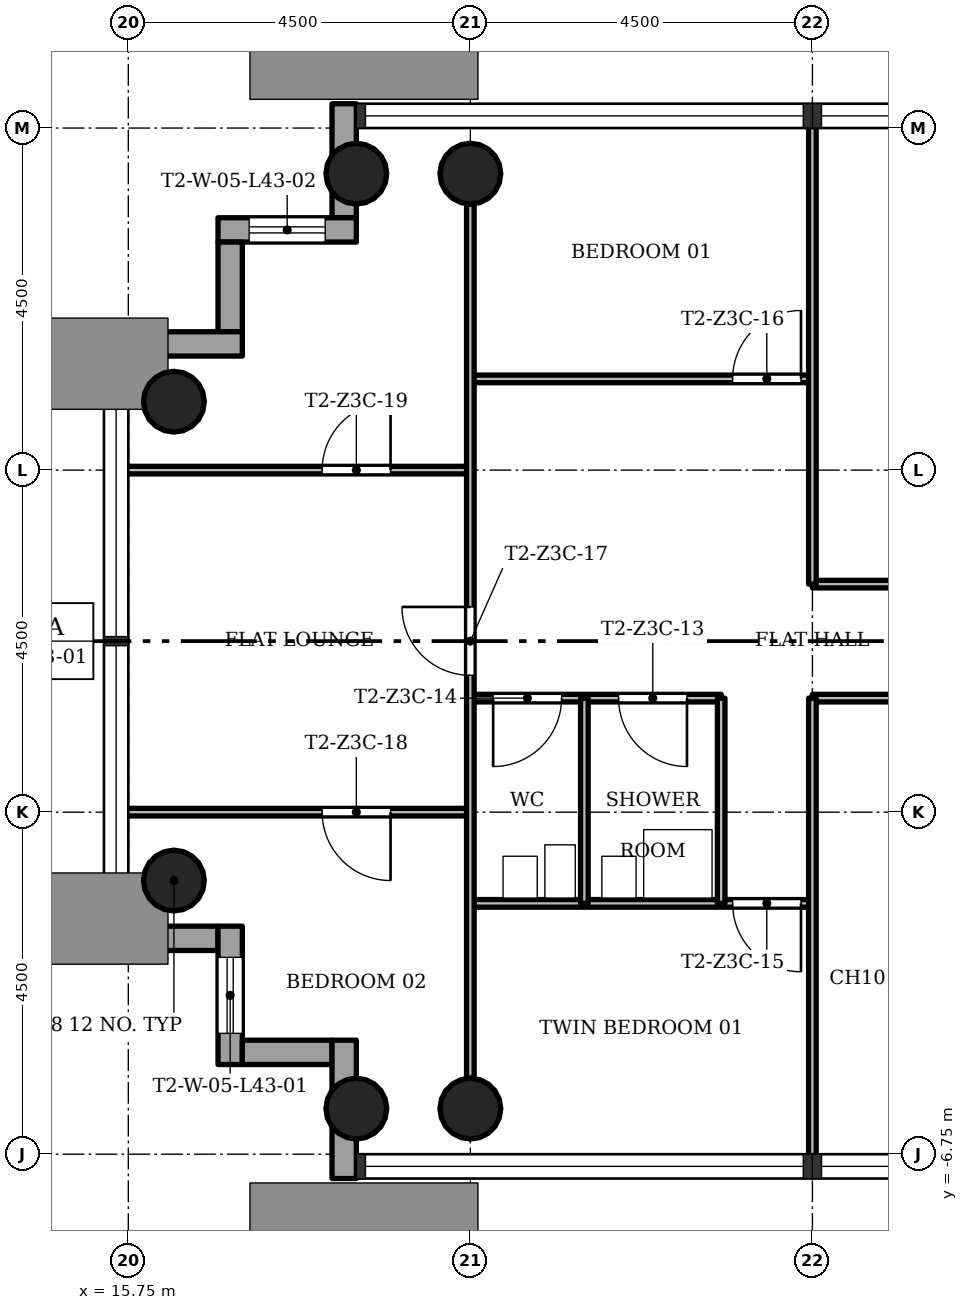
"""IFC4 building model, lengths in metres.
Left out: names, types, materials, properties, quantities, classifications, styles, units other than length and angle.
Written with IfcOpenShell. Run it as: python <this file> out.ifc"""

import sys

from ifc_helpers import new_model, si_unit, direction, frame, frame_2d, origin, origin_2d, place, context, subcontext, project, spatial, rectangle, hollow_circle, extrude, element, fill, save


model = new_model("IFC4")
c1 = context("Model", 3, precision=1e-05, world=origin(), true_north=direction((0.0, 1.0)))
c2 = subcontext(c1, "Body", "Model", "MODEL_VIEW")
j1 = project(units=[si_unit("LENGTHUNIT", "METRE"), si_unit("PLANEANGLEUNIT", "RADIAN")], contexts=[c1])
p1 = place(None, origin())
s1 = spatial("IfcSite", under=j1, at=p1, CompositionType="ELEMENT")
p2 = place(p1, origin())
s2 = spatial("IfcBuilding", under=s1, at=p2, CompositionType="ELEMENT")
p3 = place(p2, frame((0.0, 0.0, 157.5)))
s3 = spatial("IfcBuildingStorey", under=s2, at=p3, CompositionType="ELEMENT", Elevation=157.5)
for number, where, z_axis, x_axis in (
    (1, (20.25, 6.15, 0.0), (0.0, 0.0, 1.0), (1.0, 0.0, 0.0)),
    (2, (20.25, -6.15, 0.0), (0.0, 0.0, 1.0), (1.0, 0.0, 0.0)),
    (3, (18.75, 6.15, 0.0), (0.0, 0.0, 1.0), (1.0, 0.0, 0.0)),
    (4, (18.75, -6.15, 0.0), (0.0, 0.0, 1.0), (1.0, 0.0, 0.0)),
    (5, (16.35, 3.15, 0.0), (0.0, 0.0, 1.0), (1.0, 0.0, 0.0)),
    (6, (16.35, -3.15, 0.0), (0.0, 0.0, 1.0), (1.0, 0.0, 0.0)),
):
    element("IfcColumn", number, at=place(p3, frame(where, z_axis=z_axis, x_axis=x_axis)), inside=s3, PredefinedType="COLUMN", context=c2, shape_type="SweptSolid", body=[
        extrude(hollow_circle(Radius=0.4, WallThickness=0.028, at=origin_2d()), origin(), (0.0, 0.0, 1.0), 3.4),
    ])
p4 = place(p3, frame((18.59, 7.07, -0.3), z_axis=(0.0, 0.0, 1.0), x_axis=(0.0, -1.0, 0.0)))
e7 = element("IfcWall", 7, at=p4, inside=s3, PredefinedType="STANDARD", context=c2, shape_type="SweptSolid", body=[
    extrude(rectangle(XDim=1.5, YDim=0.32, at=frame_2d((0.75, 0.0))), origin(), (0.0, 0.0, 1.0), 3.4),
])
p5 = place(p3, frame((18.75, 5.41, -0.3), z_axis=(0.0, 0.0, 1.0), x_axis=(-1.0, 0.0, 0.0)))
e8 = element("IfcWall", 8, at=p5, inside=s3, PredefinedType="STANDARD", context=c2, shape_type="SweptSolid", body=[
    extrude(rectangle(XDim=1.82, YDim=0.32, at=frame_2d((0.91, 0.0))), origin(), (0.0, 0.0, 1.0), 3.4),
])
p6 = place(p5, frame((0.41, 0.0, 1.2)))
e9 = element("IfcOpeningElement", 9, at=p6, cuts=e8, PredefinedType="OPENING", context=c2, shape_type="SweptSolid", body=[
    extrude(rectangle(XDim=1.0, YDim=1.5, at=frame_2d((0.5, 0.75))), frame((0.0, 0.17, 0.0), z_axis=(0.0, -1.0, 0.0), x_axis=(1.0, 0.0, 0.0)), (0.0, 0.0, 1.0), 0.34),
])
p7 = place(p3, frame((17.09, 5.25, -0.3), z_axis=(0.0, 0.0, 1.0), x_axis=(0.0, -1.0, 0.0)))
e10 = element("IfcWall", 10, at=p7, inside=s3, PredefinedType="STANDARD", context=c2, shape_type="SweptSolid", body=[
    extrude(rectangle(XDim=1.18, YDim=0.32, at=frame_2d((0.59, 0.0))), origin(), (0.0, 0.0, 1.0), 3.4),
])
p8 = place(p3, frame((17.25, 3.91, -0.3), z_axis=(0.0, 0.0, 1.0), x_axis=(-1.0, 0.0, 0.0)))
e11 = element("IfcWall", 11, at=p8, inside=s3, PredefinedType="STANDARD", context=c2, shape_type="SweptSolid", body=[
    extrude(rectangle(XDim=1.82, YDim=0.32, at=frame_2d((0.91, 0.0))), origin(), (0.0, 0.0, 1.0), 3.4),
])
p9 = place(p3, frame((15.43, -3.91, -0.3), z_axis=(0.0, 0.0, 1.0), x_axis=(1.0, 0.0, 0.0)))
e12 = element("IfcWall", 12, at=p9, inside=s3, PredefinedType="STANDARD", context=c2, shape_type="SweptSolid", body=[
    extrude(rectangle(XDim=1.5, YDim=0.32, at=frame_2d((0.75, 0.0))), origin(), (0.0, 0.0, 1.0), 3.4),
])
p10 = place(p3, frame((17.09, -3.75, -0.3), z_axis=(0.0, 0.0, 1.0), x_axis=(0.0, -1.0, 0.0)))
e13 = element("IfcWall", 13, at=p10, inside=s3, PredefinedType="STANDARD", context=c2, shape_type="SweptSolid", body=[
    extrude(rectangle(XDim=1.82, YDim=0.32, at=frame_2d((0.91, 0.0))), origin(), (0.0, 0.0, 1.0), 3.4),
])
p11 = place(p10, frame((0.41, 0.0, 1.2)))
e14 = element("IfcOpeningElement", 14, at=p11, cuts=e13, PredefinedType="OPENING", context=c2, shape_type="SweptSolid", body=[
    extrude(rectangle(XDim=1.0, YDim=1.5, at=frame_2d((0.5, 0.75))), frame((0.0, 0.17, 0.0), z_axis=(0.0, -1.0, 0.0), x_axis=(1.0, 0.0, 0.0)), (0.0, 0.0, 1.0), 0.34),
])
p12 = place(p3, frame((17.25, -5.41, -0.3), z_axis=(0.0, 0.0, 1.0), x_axis=(1.0, 0.0, 0.0)))
e15 = element("IfcWall", 15, at=p12, inside=s3, PredefinedType="STANDARD", context=c2, shape_type="SweptSolid", body=[
    extrude(rectangle(XDim=1.18, YDim=0.32, at=frame_2d((0.59, 0.0))), origin(), (0.0, 0.0, 1.0), 3.4),
])
p13 = place(p3, frame((18.59, -5.25, -0.3), z_axis=(0.0, 0.0, 1.0), x_axis=(0.0, -1.0, 0.0)))
e16 = element("IfcWall", 16, at=p13, inside=s3, PredefinedType="STANDARD", context=c2, shape_type="SweptSolid", body=[
    extrude(rectangle(XDim=1.82, YDim=0.32, at=frame_2d((0.91, 0.0))), origin(), (0.0, 0.0, 1.0), 3.4),
])
p14 = place(p3, frame((24.75, -3.45, 0.0), z_axis=(0.0, 0.0, 1.0), x_axis=(-1.0, 0.0, 0.0)))
e17 = element("IfcWall", 17, at=p14, inside=s3, PredefinedType="PARTITIONING", context=c2, shape_type="SweptSolid", body=[
    extrude(rectangle(XDim=4.5, YDim=0.1, at=frame_2d((2.25, 0.0))), origin(), (0.0, 0.0, 1.0), 3.0),
])
p15 = place(p14, frame((0.15, 0.0, 0.0)))
e18 = element("IfcOpeningElement", 18, at=p15, cuts=e17, PredefinedType="OPENING", context=c2, shape_type="SweptSolid", body=[
    extrude(rectangle(XDim=0.9, YDim=2.1, at=frame_2d((0.45, 1.05))), frame((0.0, 0.06, 0.0), z_axis=(0.0, -1.0, 0.0), x_axis=(1.0, 0.0, 0.0)), (0.0, 0.0, 1.0), 0.12),
])
p16 = place(p3, frame((20.25, -2.25, 0.0), z_axis=(0.0, 0.0, 1.0), x_axis=(-1.0, 0.0, 0.0)))
e19 = element("IfcWall", 19, at=p16, inside=s3, PredefinedType="PARTITIONING", context=c2, shape_type="SweptSolid", body=[
    extrude(rectangle(XDim=4.6, YDim=0.1, at=frame_2d((2.3, 0.0))), origin(), (0.0, 0.0, 1.0), 3.0),
])
p17 = place(p16, frame((1.05, 0.0, 0.0)))
e20 = element("IfcOpeningElement", 20, at=p17, cuts=e19, PredefinedType="OPENING", context=c2, shape_type="SweptSolid", body=[
    extrude(rectangle(XDim=0.9, YDim=2.1, at=frame_2d((0.45, 1.05))), frame((0.0, 0.06, 0.0), z_axis=(0.0, -1.0, 0.0), x_axis=(1.0, 0.0, 0.0)), (0.0, 0.0, 1.0), 0.12),
])
p18 = place(p3, frame((29.25, -0.75, 0.0), z_axis=(0.0, 0.0, 1.0), x_axis=(-1.0, 0.0, 0.0)))
e21 = element("IfcWall", 21, at=p18, inside=s3, PredefinedType="PARTITIONING", context=c2, shape_type="SweptSolid", body=[
    extrude(rectangle(XDim=4.5, YDim=0.1, at=frame_2d((2.25, 0.0))), origin(), (0.0, 0.0, 1.0), 3.0),
])
p19 = place(p18, frame((1.8, 0.0, 0.0)))
e22 = element("IfcOpeningElement", 22, at=p19, cuts=e21, PredefinedType="OPENING", context=c2, shape_type="SweptSolid", body=[
    extrude(rectangle(XDim=0.9, YDim=2.1, at=frame_2d((0.45, 1.05))), frame((0.0, 0.06, 0.0), z_axis=(0.0, -1.0, 0.0), x_axis=(1.0, 0.0, 0.0)), (0.0, 0.0, 1.0), 0.12),
])
p20 = place(p3, frame((23.55, -0.75, 0.0), z_axis=(0.0, 0.0, 1.0), x_axis=(-1.0, 0.0, 0.0)))
e23 = element("IfcWall", 23, at=p20, inside=s3, PredefinedType="PARTITIONING", context=c2, shape_type="SweptSolid", body=[
    extrude(rectangle(XDim=3.3, YDim=0.1, at=frame_2d((1.65, 0.0))), origin(), (0.0, 0.0, 1.0), 3.0),
])
p21 = place(p20, frame((0.45, 0.0, 0.0)))
e24 = element("IfcOpeningElement", 24, at=p21, cuts=e23, PredefinedType="OPENING", context=c2, shape_type="SweptSolid", body=[
    extrude(rectangle(XDim=0.9, YDim=2.1, at=frame_2d((0.45, 1.05))), frame((0.0, 0.06, 0.0), z_axis=(0.0, -1.0, 0.0), x_axis=(1.0, 0.0, 0.0)), (0.0, 0.0, 1.0), 0.12),
])
p22 = place(p20, frame((2.1, 0.0, 0.0)))
e25 = element("IfcOpeningElement", 25, at=p22, cuts=e23, PredefinedType="OPENING", context=c2, shape_type="SweptSolid", body=[
    extrude(rectangle(XDim=0.9, YDim=2.1, at=frame_2d((0.45, 1.05))), frame((0.0, 0.06, 0.0), z_axis=(0.0, -1.0, 0.0), x_axis=(1.0, 0.0, 0.0)), (0.0, 0.0, 1.0), 0.12),
])
p23 = place(p3, frame((29.25, 0.75, 0.0), z_axis=(0.0, 0.0, 1.0), x_axis=(-1.0, 0.0, 0.0)))
e26 = element("IfcWall", 26, at=p23, inside=s3, PredefinedType="PARTITIONING", context=c2, shape_type="SweptSolid", body=[
    extrude(rectangle(XDim=4.5, YDim=0.1, at=frame_2d((2.25, 0.0))), origin(), (0.0, 0.0, 1.0), 3.0),
])
p24 = place(p23, frame((1.8, 0.0, 0.0)))
e27 = element("IfcOpeningElement", 27, at=p24, cuts=e26, PredefinedType="OPENING", context=c2, shape_type="SweptSolid", body=[
    extrude(rectangle(XDim=0.9, YDim=2.1, at=frame_2d((0.45, 1.05))), frame((0.0, 0.06, 0.0), z_axis=(0.0, -1.0, 0.0), x_axis=(1.0, 0.0, 0.0)), (0.0, 0.0, 1.0), 0.12),
])
p25 = place(p3, frame((20.25, 2.25, 0.0), z_axis=(0.0, 0.0, 1.0), x_axis=(-1.0, 0.0, 0.0)))
e28 = element("IfcWall", 28, at=p25, inside=s3, PredefinedType="PARTITIONING", context=c2, shape_type="SweptSolid", body=[
    extrude(rectangle(XDim=4.6, YDim=0.1, at=frame_2d((2.3, 0.0))), origin(), (0.0, 0.0, 1.0), 3.0),
])
p26 = place(p25, frame((1.05, 0.0, 0.0)))
e29 = element("IfcOpeningElement", 29, at=p26, cuts=e28, PredefinedType="OPENING", context=c2, shape_type="SweptSolid", body=[
    extrude(rectangle(XDim=0.9, YDim=2.1, at=frame_2d((0.45, 1.05))), frame((0.0, 0.06, 0.0), z_axis=(0.0, -1.0, 0.0), x_axis=(1.0, 0.0, 0.0)), (0.0, 0.0, 1.0), 0.12),
])
p27 = place(p3, frame((24.75, 3.45, 0.0), z_axis=(0.0, 0.0, 1.0), x_axis=(-1.0, 0.0, 0.0)))
e30 = element("IfcWall", 30, at=p27, inside=s3, PredefinedType="PARTITIONING", context=c2, shape_type="SweptSolid", body=[
    extrude(rectangle(XDim=4.5, YDim=0.1, at=frame_2d((2.25, 0.0))), origin(), (0.0, 0.0, 1.0), 3.0),
])
p28 = place(p27, frame((0.15, 0.0, 0.0)))
e31 = element("IfcOpeningElement", 31, at=p28, cuts=e30, PredefinedType="OPENING", context=c2, shape_type="SweptSolid", body=[
    extrude(rectangle(XDim=0.9, YDim=2.1, at=frame_2d((0.45, 1.05))), frame((0.0, 0.06, 0.0), z_axis=(0.0, -1.0, 0.0), x_axis=(1.0, 0.0, 0.0)), (0.0, 0.0, 1.0), 0.12),
])
for number, where, z_axis, x_axis in (
    (32, (24.75, -6.85, 0.0), (0.0, 0.0, 1.0), (0.0, 1.0, 0.0)),
    (33, (24.75, 0.75, 0.0), (0.0, 0.0, 1.0), (0.0, 1.0, 0.0)),
):
    element("IfcWall", number, at=place(p3, frame(where, z_axis=z_axis, x_axis=x_axis)), inside=s3, PredefinedType="PARTITIONING", context=c2, shape_type="SweptSolid", body=[
        extrude(rectangle(XDim=6.1, YDim=0.1, at=frame_2d((3.05, 0.0))), origin(), (0.0, 0.0, 1.0), 3.0),
    ])
for number, where, z_axis, x_axis in (
    (34, (23.55, -3.45, 0.0), (0.0, 0.0, 1.0), (0.0, 1.0, 0.0)),
    (35, (21.75, -3.45, 0.0), (0.0, 0.0, 1.0), (0.0, 1.0, 0.0)),
):
    element("IfcWall", number, at=place(p3, frame(where, z_axis=z_axis, x_axis=x_axis)), inside=s3, PredefinedType="PARTITIONING", context=c2, shape_type="SweptSolid", body=[
        extrude(rectangle(XDim=2.7, YDim=0.1, at=frame_2d((1.35, 0.0))), origin(), (0.0, 0.0, 1.0), 3.0),
    ])
p29 = place(p3, frame((20.25, -5.75, 0.0), z_axis=(0.0, 0.0, 1.0), x_axis=(0.0, 1.0, 0.0)))
e36 = element("IfcWall", 36, at=p29, inside=s3, PredefinedType="PARTITIONING", context=c2, shape_type="SweptSolid", body=[
    extrude(rectangle(XDim=11.5, YDim=0.1, at=frame_2d((5.75, 0.0))), origin(), (0.0, 0.0, 1.0), 3.0),
])
p30 = place(p29, frame((5.3, 0.0, 0.0)))
e37 = element("IfcOpeningElement", 37, at=p30, cuts=e36, PredefinedType="OPENING", context=c2, shape_type="SweptSolid", body=[
    extrude(rectangle(XDim=0.9, YDim=2.1, at=frame_2d((0.45, 1.05))), frame((0.0, 0.06, 0.0), z_axis=(0.0, -1.0, 0.0), x_axis=(1.0, 0.0, 0.0)), (0.0, 0.0, 1.0), 0.12),
])
p31 = place(p21, origin())
e38 = element("IfcDoor", 38, at=p31, inside=s3, OperationType="SINGLE_SWING_RIGHT", PredefinedType="DOOR", context=c2, shape_type="SweptSolid", body=[
    extrude(rectangle(XDim=0.9, YDim=2.1, at=frame_2d((0.45, 1.05))), frame((0.0, 0.025, 0.0), z_axis=(0.0, -1.0, 0.0), x_axis=(1.0, 0.0, 0.0)), (0.0, 0.0, 1.0), 0.05),
])
fill(e24, e38)
p32 = place(p22, origin())
e39 = element("IfcDoor", 39, at=p32, inside=s3, OperationType="SINGLE_SWING_LEFT", PredefinedType="DOOR", context=c2, shape_type="SweptSolid", body=[
    extrude(rectangle(XDim=0.9, YDim=2.1, at=frame_2d((0.45, 1.05))), frame((0.0, 0.025, 0.0), z_axis=(0.0, -1.0, 0.0), x_axis=(1.0, 0.0, 0.0)), (0.0, 0.0, 1.0), 0.05),
])
fill(e25, e39)
p33 = place(p15, origin())
e40 = element("IfcDoor", 40, at=p33, inside=s3, OperationType="SINGLE_SWING_RIGHT", PredefinedType="DOOR", context=c2, shape_type="SweptSolid", body=[
    extrude(rectangle(XDim=0.9, YDim=2.1, at=frame_2d((0.45, 1.05))), frame((0.0, 0.025, 0.0), z_axis=(0.0, -1.0, 0.0), x_axis=(1.0, 0.0, 0.0)), (0.0, 0.0, 1.0), 0.05),
])
fill(e18, e40)
p34 = place(p28, origin())
e41 = element("IfcDoor", 41, at=p34, inside=s3, OperationType="SINGLE_SWING_LEFT", PredefinedType="DOOR", context=c2, shape_type="SweptSolid", body=[
    extrude(rectangle(XDim=0.9, YDim=2.1, at=frame_2d((0.45, 1.05))), frame((0.0, 0.025, 0.0), z_axis=(0.0, -1.0, 0.0), x_axis=(1.0, 0.0, 0.0)), (0.0, 0.0, 1.0), 0.05),
])
fill(e31, e41)
p35 = place(p30, origin())
e42 = element("IfcDoor", 42, at=p35, inside=s3, OperationType="SINGLE_SWING_LEFT", PredefinedType="DOOR", context=c2, shape_type="SweptSolid", body=[
    extrude(rectangle(XDim=0.9, YDim=2.1, at=frame_2d((0.45, 1.05))), frame((0.0, 0.025, 0.0), z_axis=(0.0, -1.0, 0.0), x_axis=(1.0, 0.0, 0.0)), (0.0, 0.0, 1.0), 0.05),
])
fill(e37, e42)
p36 = place(p17, origin())
e43 = element("IfcDoor", 43, at=p36, inside=s3, OperationType="SINGLE_SWING_RIGHT", PredefinedType="DOOR", context=c2, shape_type="SweptSolid", body=[
    extrude(rectangle(XDim=0.9, YDim=2.1, at=frame_2d((0.45, 1.05))), frame((0.0, 0.025, 0.0), z_axis=(0.0, -1.0, 0.0), x_axis=(1.0, 0.0, 0.0)), (0.0, 0.0, 1.0), 0.05),
])
fill(e20, e43)
p37 = place(p26, origin())
e44 = element("IfcDoor", 44, at=p37, inside=s3, OperationType="SINGLE_SWING_LEFT", PredefinedType="DOOR", context=c2, shape_type="SweptSolid", body=[
    extrude(rectangle(XDim=0.9, YDim=2.1, at=frame_2d((0.45, 1.05))), frame((0.0, 0.025, 0.0), z_axis=(0.0, -1.0, 0.0), x_axis=(1.0, 0.0, 0.0)), (0.0, 0.0, 1.0), 0.05),
])
fill(e29, e44)
p38 = place(p11, origin())
e45 = element("IfcWindow", 45, at=p38, inside=s3, PartitioningType="SINGLE_PANEL", PredefinedType="WINDOW", context=c2, shape_type="SweptSolid", body=[
    extrude(rectangle(XDim=1.0, YDim=1.5, at=frame_2d((0.5, 0.75))), frame((0.0, 0.03, 0.0), z_axis=(0.0, -1.0, 0.0), x_axis=(1.0, 0.0, 0.0)), (0.0, 0.0, 1.0), 0.06),
])
fill(e14, e45)
p39 = place(p6, origin())
e46 = element("IfcWindow", 46, at=p39, inside=s3, PartitioningType="SINGLE_PANEL", PredefinedType="WINDOW", context=c2, shape_type="SweptSolid", body=[
    extrude(rectangle(XDim=1.0, YDim=1.5, at=frame_2d((0.5, 0.75))), frame((0.0, 0.03, 0.0), z_axis=(0.0, -1.0, 0.0), x_axis=(1.0, 0.0, 0.0)), (0.0, 0.0, 1.0), 0.06),
])
fill(e9, e46)
save(model, sys.argv[1])
